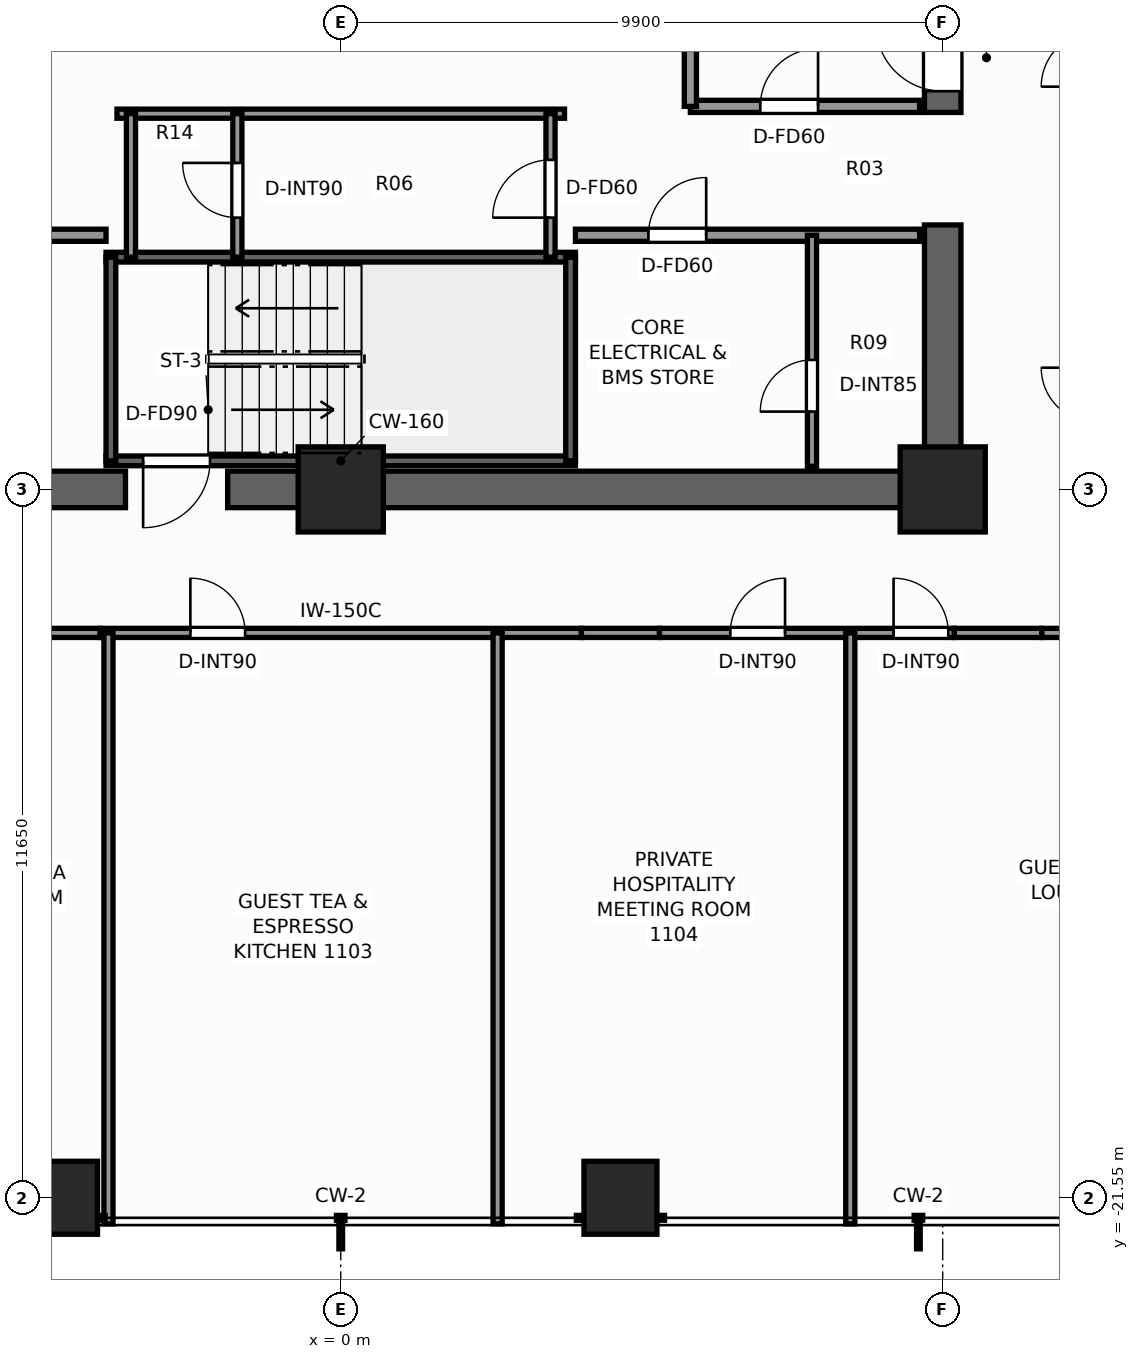
"""IFC4 building model, lengths in metres.
Left out: names, types, materials, properties, quantities, classifications, styles, units other than length and angle.
Written with IfcOpenShell. Run it as: python <this file> out.ifc"""

import sys

from ifc_helpers import new_model, si_unit, direction, frame, frame_2d, origin, origin_2d, place, context, subcontext, project, spatial, rectangle, extrude, element, fill, save


model = new_model("IFC4")
c1 = context("Model", 3, precision=1e-05, world=origin(), true_north=direction((0.0, 1.0)))
c2 = subcontext(c1, "Body", "Model", "MODEL_VIEW")
j1 = project(units=[si_unit("LENGTHUNIT", "METRE"), si_unit("PLANEANGLEUNIT", "RADIAN")], contexts=[c1])
p1 = place(None, origin())
s1 = spatial("IfcSite", under=j1, at=p1, CompositionType="ELEMENT")
p2 = place(p1, origin())
s2 = spatial("IfcBuilding", under=s1, at=p2, CompositionType="ELEMENT")
p3 = place(p2, frame((0.0, 0.0, 40.3)))
s3 = spatial("IfcBuildingStorey", under=s2, at=p3, CompositionType="ELEMENT", Elevation=40.3)
p4 = place(p3, frame((10.2, -9.9, 0.0), z_axis=(0.0, 0.0, 1.0), x_axis=(-1.0, 0.0, 0.0)))
e1 = element("IfcWall", 1, at=p4, inside=s3, PredefinedType="SHEAR", context=c2, shape_type="SweptSolid", body=[
    extrude(rectangle(XDim=12.06, YDim=0.6, at=frame_2d((6.03, 0.0))), origin(), (0.0, 0.0, 1.0), 3.3),
])
p5 = place(p3, frame((-3.54, -9.9, 0.0), z_axis=(0.0, 0.0, 1.0), x_axis=(-1.0, 0.0, 0.0)))
e2 = element("IfcWall", 2, at=p5, inside=s3, PredefinedType="SHEAR", context=c2, shape_type="SweptSolid", body=[
    extrude(rectangle(XDim=6.66, YDim=0.6, at=frame_2d((3.33, 0.0))), origin(), (0.0, 0.0, 1.0), 3.3),
])
p6 = place(p3, frame((9.9, -9.6, 0.0), z_axis=(0.0, 0.0, 1.0), x_axis=(0.0, 1.0, 0.0)))
e3 = element("IfcWall", 3, at=p6, inside=s3, PredefinedType="SHEAR", context=c2, shape_type="SweptSolid", body=[
    extrude(rectangle(XDim=4.05, YDim=0.6, at=frame_2d((2.025, 0.0))), origin(), (0.0, 0.0, 1.0), 3.3),
])
p7 = place(p3, frame((9.9, -3.7, 0.0), z_axis=(0.0, 0.0, 1.0), x_axis=(0.0, 1.0, 0.0)))
e4 = element("IfcWall", 4, at=p7, inside=s3, PredefinedType="SHEAR", context=c2, shape_type="SweptSolid", body=[
    extrude(rectangle(XDim=13.3, YDim=0.6, at=frame_2d((6.65, 0.0))), origin(), (0.0, 0.0, 1.0), 3.3),
])
p8 = place(p7, frame((0.35, 0.0, 0.0)))
e5 = element("IfcOpeningElement", 5, at=p8, cuts=e4, PredefinedType="OPENING", context=c2, shape_type="SweptSolid", body=[
    extrude(rectangle(XDim=1.1, YDim=2.2, at=frame_2d((0.55, 1.1))), frame((0.0, 0.31, 0.0), z_axis=(0.0, -1.0, 0.0), x_axis=(1.0, 0.0, 0.0)), (0.0, 0.0, 1.0), 0.62),
])
for number, where, z_axis, x_axis in (
    (6, (9.9, -9.9, 0.0), (0.0, 0.0, 1.0), (1.0, 0.0, 0.0)),
    (7, (0.0, -9.9, 0.0), (0.0, 0.0, 1.0), (1.0, 0.0, 0.0)),
):
    element("IfcColumn", number, at=place(p3, frame(where, z_axis=z_axis, x_axis=x_axis)), inside=s3, PredefinedType="COLUMN", context=c2, shape_type="SweptSolid", body=[
        extrude(rectangle(XDim=1.4, YDim=1.4, at=origin_2d()), origin(), (0.0, 0.0, 1.0), 3.3),
    ])
for number, where, z_axis, x_axis in (
    (8, (-4.6, -21.55, 0.0), (0.0, 0.0, 1.0), (1.0, 0.0, 0.0)),
    (9, (4.6, -21.55, 0.0), (0.0, 0.0, 1.0), (1.0, 0.0, 0.0)),
):
    element("IfcColumn", number, at=place(p3, frame(where, z_axis=z_axis, x_axis=x_axis)), inside=s3, PredefinedType="COLUMN", context=c2, shape_type="SweptSolid", body=[
        extrude(rectangle(XDim=1.2, YDim=1.2, at=origin_2d()), origin(), (0.0, 0.0, 1.0), 3.3),
    ])
p9 = place(p3, frame((3.86, -9.43, 0.0), z_axis=(0.0, 0.0, 1.0), x_axis=(-1.0, 0.0, 0.0)))
e10 = element("IfcWall", 10, at=p9, inside=s3, PredefinedType="SHEAR", context=c2, shape_type="SweptSolid", body=[
    extrude(rectangle(XDim=7.72, YDim=0.16, at=frame_2d((3.86, 0.0))), origin(), (0.0, 0.0, 1.0), 3.3),
])
p10 = place(p9, frame((6.01, 0.0, 0.0)))
e11 = element("IfcOpeningElement", 11, at=p10, cuts=e10, PredefinedType="OPENING", context=c2, shape_type="SweptSolid", body=[
    extrude(rectangle(XDim=1.1, YDim=2.2, at=frame_2d((0.55, 1.1))), frame((0.0, 0.09, 0.0), z_axis=(0.0, -1.0, 0.0), x_axis=(1.0, 0.0, 0.0)), (0.0, 0.0, 1.0), 0.18),
])
p11 = place(p3, frame((-3.86, -6.08, 0.0), z_axis=(0.0, 0.0, 1.0), x_axis=(1.0, 0.0, 0.0)))
e12 = element("IfcWall", 12, at=p11, inside=s3, PredefinedType="SHEAR", context=c2, shape_type="SweptSolid", body=[
    extrude(rectangle(XDim=7.72, YDim=0.16, at=frame_2d((3.86, 0.0))), origin(), (0.0, 0.0, 1.0), 3.3),
])
for number, where, z_axis, x_axis in (
    (13, (-3.78, -9.43, 0.0), (0.0, 0.0, 1.0), (0.0, 1.0, 0.0)),
    (14, (3.78, -9.43, 0.0), (0.0, 0.0, 1.0), (0.0, 1.0, 0.0)),
):
    element("IfcWall", number, at=place(p3, frame(where, z_axis=z_axis, x_axis=x_axis)), inside=s3, PredefinedType="SHEAR", context=c2, shape_type="SweptSolid", body=[
        extrude(rectangle(XDim=3.35, YDim=0.16, at=frame_2d((1.675, 0.0))), origin(), (0.0, 0.0, 1.0), 3.3),
    ])
p12 = place(p3, frame((5.75, -3.6, 0.0), z_axis=(0.0, 0.0, 1.0), x_axis=(1.0, 0.0, 0.0)))
e15 = element("IfcWall", 15, at=p12, inside=s3, PredefinedType="SOLIDWALL", context=c2, shape_type="SweptSolid", body=[
    extrude(rectangle(XDim=3.77, YDim=0.2, at=frame_2d((1.885, 0.0))), origin(), (0.0, 0.0, 1.0), 3.06),
])
p13 = place(p12, frame((1.15, 0.0, 0.0)))
e16 = element("IfcOpeningElement", 16, at=p13, cuts=e15, PredefinedType="OPENING", context=c2, shape_type="SweptSolid", body=[
    extrude(rectangle(XDim=0.95, YDim=2.06, at=frame_2d((0.475, 1.03))), frame((0.0, 0.11, 0.0), z_axis=(0.0, -1.0, 0.0), x_axis=(1.0, 0.0, 0.0)), (0.0, 0.0, 1.0), 0.22),
])
p14 = place(p3, frame((5.75, -3.6, 0.0), z_axis=(0.0, 0.0, 1.0), x_axis=(0.0, 1.0, 0.0)))
e17 = element("IfcWall", 17, at=p14, inside=s3, PredefinedType="SOLIDWALL", context=c2, shape_type="SweptSolid", body=[
    extrude(rectangle(XDim=5.57, YDim=0.2, at=frame_2d((2.785, 0.0))), origin(), (0.0, 0.0, 1.0), 3.06),
])
p15 = place(p14, frame((2.75, 0.0, 0.0)))
e18 = element("IfcOpeningElement", 18, at=p15, cuts=e17, PredefinedType="OPENING", context=c2, shape_type="SweptSolid", body=[
    extrude(rectangle(XDim=1.1, YDim=2.2, at=frame_2d((0.55, 1.1))), frame((0.0, 0.11, 0.0), z_axis=(0.0, -1.0, 0.0), x_axis=(1.0, 0.0, 0.0)), (0.0, 0.0, 1.0), 0.22),
])
p16 = place(p3, frame((-9.52, -5.72, 0.0), z_axis=(0.0, 0.0, 1.0), x_axis=(1.0, 0.0, 0.0)))
e19 = element("IfcWall", 19, at=p16, inside=s3, PredefinedType="SOLIDWALL", context=c2, shape_type="SweptSolid", body=[
    extrude(rectangle(XDim=5.66, YDim=0.2, at=frame_2d((2.83, 0.0))), origin(), (0.0, 0.0, 1.0), 3.06),
])
p17 = place(p16, frame((2.8, 0.0, 0.0)))
e20 = element("IfcOpeningElement", 20, at=p17, cuts=e19, PredefinedType="OPENING", context=c2, shape_type="SweptSolid", body=[
    extrude(rectangle(XDim=0.95, YDim=2.06, at=frame_2d((0.475, 1.03))), frame((0.0, 0.11, 0.0), z_axis=(0.0, -1.0, 0.0), x_axis=(1.0, 0.0, 0.0)), (0.0, 0.0, 1.0), 0.22),
])
p18 = place(p3, frame((3.86, -5.72, 0.0), z_axis=(0.0, 0.0, 1.0), x_axis=(1.0, 0.0, 0.0)))
e21 = element("IfcWall", 21, at=p18, inside=s3, PredefinedType="SOLIDWALL", context=c2, shape_type="SweptSolid", body=[
    extrude(rectangle(XDim=5.66, YDim=0.2, at=frame_2d((2.83, 0.0))), origin(), (0.0, 0.0, 1.0), 3.06),
])
p19 = place(p18, frame((1.2, 0.0, 0.0)))
e22 = element("IfcOpeningElement", 22, at=p19, cuts=e21, PredefinedType="OPENING", context=c2, shape_type="SweptSolid", body=[
    extrude(rectangle(XDim=0.95, YDim=2.06, at=frame_2d((0.475, 1.03))), frame((0.0, 0.11, 0.0), z_axis=(0.0, -1.0, 0.0), x_axis=(1.0, 0.0, 0.0)), (0.0, 0.0, 1.0), 0.22),
])
p20 = place(p3, frame((7.75, -9.52, 0.0), z_axis=(0.0, 0.0, 1.0), x_axis=(0.0, 1.0, 0.0)))
e23 = element("IfcWall", 23, at=p20, inside=s3, PredefinedType="PARTITIONING", context=c2, shape_type="SweptSolid", body=[
    extrude(rectangle(XDim=3.8, YDim=0.15, at=frame_2d((1.9, 0.0))), origin(), (0.0, 0.0, 1.0), 3.06),
])
p21 = place(p20, frame((0.9, 0.0, 0.0)))
e24 = element("IfcOpeningElement", 24, at=p21, cuts=e23, PredefinedType="OPENING", context=c2, shape_type="SweptSolid", body=[
    extrude(rectangle(XDim=0.85, YDim=2.03, at=frame_2d((0.425, 1.015))), frame((0.0, 0.085, 0.0), z_axis=(0.0, -1.0, 0.0), x_axis=(1.0, 0.0, 0.0)), (0.0, 0.0, 1.0), 0.17),
])
p22 = place(p3, frame((-3.68, -3.72, 0.0), z_axis=(0.0, 0.0, 1.0), x_axis=(1.0, 0.0, 0.0)))
e25 = element("IfcWall", 25, at=p22, inside=s3, PredefinedType="PARTITIONING", context=c2, shape_type="SweptSolid", body=[
    extrude(rectangle(XDim=7.36, YDim=0.15, at=frame_2d((3.68, 0.0))), origin(), (0.0, 0.0, 1.0), 3.06),
])
p23 = place(p3, frame((3.45, -6.08, 0.0), z_axis=(0.0, 0.0, 1.0), x_axis=(0.0, 1.0, 0.0)))
e26 = element("IfcWall", 26, at=p23, inside=s3, PredefinedType="PARTITIONING", context=c2, shape_type="SweptSolid", body=[
    extrude(rectangle(XDim=2.36, YDim=0.15, at=frame_2d((1.18, 0.0))), origin(), (0.0, 0.0, 1.0), 3.06),
])
p24 = place(p23, frame((0.65, 0.0, 0.0)))
e27 = element("IfcOpeningElement", 27, at=p24, cuts=e26, PredefinedType="OPENING", context=c2, shape_type="SweptSolid", body=[
    extrude(rectangle(XDim=0.95, YDim=2.06, at=frame_2d((0.475, 1.03))), frame((0.0, 0.085, 0.0), z_axis=(0.0, -1.0, 0.0), x_axis=(1.0, 0.0, 0.0)), (0.0, 0.0, 1.0), 0.17),
])
p25 = place(p3, frame((-3.45, -6.08, 0.0), z_axis=(0.0, 0.0, 1.0), x_axis=(0.0, 1.0, 0.0)))
e28 = element("IfcWall", 28, at=p25, inside=s3, PredefinedType="PARTITIONING", context=c2, shape_type="SweptSolid", body=[
    extrude(rectangle(XDim=2.36, YDim=0.15, at=frame_2d((1.18, 0.0))), origin(), (0.0, 0.0, 1.0), 3.06),
])
p26 = place(p3, frame((-1.7, -6.08, 0.0), z_axis=(0.0, 0.0, 1.0), x_axis=(0.0, 1.0, 0.0)))
e29 = element("IfcWall", 29, at=p26, inside=s3, PredefinedType="PARTITIONING", context=c2, shape_type="SweptSolid", body=[
    extrude(rectangle(XDim=2.36, YDim=0.15, at=frame_2d((1.18, 0.0))), origin(), (0.0, 0.0, 1.0), 3.06),
])
p27 = place(p26, frame((0.65, 0.0, 0.0)))
e30 = element("IfcOpeningElement", 30, at=p27, cuts=e29, PredefinedType="OPENING", context=c2, shape_type="SweptSolid", body=[
    extrude(rectangle(XDim=0.9, YDim=2.06, at=frame_2d((0.45, 1.03))), frame((0.0, 0.085, 0.0), z_axis=(0.0, -1.0, 0.0), x_axis=(1.0, 0.0, 0.0)), (0.0, 0.0, 1.0), 0.17),
])
p28 = place(p3, frame((-5.242, -12.26, 0.0), z_axis=(0.0, 0.0, 1.0), x_axis=(1.0, 0.0, 0.0)))
e31 = element("IfcWall", 31, at=p28, inside=s3, PredefinedType="PARTITIONING", context=c2, shape_type="SweptSolid", body=[
    extrude(rectangle(XDim=1.284, YDim=0.15, at=frame_2d((0.642, 0.0))), origin(), (0.0, 0.0, 1.0), 1.245),
])
p29 = place(p3, frame((-3.958, -12.26, 0.0), z_axis=(0.0, 0.0, 1.0), x_axis=(1.0, 0.0, 0.0)))
e32 = element("IfcWall", 32, at=p29, inside=s3, PredefinedType="PARTITIONING", context=c2, shape_type="SweptSolid", body=[
    extrude(rectangle(XDim=7.916, YDim=0.15, at=frame_2d((3.958, 0.0))), origin(), (0.0, 0.0, 1.0), 2.349),
])
p30 = place(p29, frame((1.485, 0.0, 0.0)))
e33 = element("IfcOpeningElement", 33, at=p30, cuts=e32, PredefinedType="OPENING", context=c2, shape_type="SweptSolid", body=[
    extrude(rectangle(XDim=0.9, YDim=2.06, at=frame_2d((0.45, 1.03))), frame((0.0, 0.085, 0.0), z_axis=(0.0, -1.0, 0.0), x_axis=(1.0, 0.0, 0.0)), (0.0, 0.0, 1.0), 0.17),
])
p31 = place(p3, frame((3.958, -12.26, 0.0), z_axis=(0.0, 0.0, 1.0), x_axis=(1.0, 0.0, 0.0)))
e34 = element("IfcWall", 34, at=p31, inside=s3, PredefinedType="PARTITIONING", context=c2, shape_type="SweptSolid", body=[
    extrude(rectangle(XDim=1.284, YDim=0.15, at=frame_2d((0.642, 0.0))), origin(), (0.0, 0.0, 1.0), 1.245),
])
p32 = place(p3, frame((5.242, -12.26, 0.0), z_axis=(0.0, 0.0, 1.0), x_axis=(1.0, 0.0, 0.0)))
e35 = element("IfcWall", 35, at=p32, inside=s3, PredefinedType="PARTITIONING", context=c2, shape_type="SweptSolid", body=[
    extrude(rectangle(XDim=4.85, YDim=0.15, at=frame_2d((2.425, 0.0))), origin(), (0.0, 0.0, 1.0), 3.06),
])
p33 = place(p32, frame((1.165, 0.0, 0.0)))
e36 = element("IfcOpeningElement", 36, at=p33, cuts=e35, PredefinedType="OPENING", context=c2, shape_type="SweptSolid", body=[
    extrude(rectangle(XDim=0.9, YDim=2.06, at=frame_2d((0.45, 1.03))), frame((0.0, 0.085, 0.0), z_axis=(0.0, -1.0, 0.0), x_axis=(1.0, 0.0, 0.0)), (0.0, 0.0, 1.0), 0.17),
])
p34 = place(p32, frame((3.85, 0.0, 0.0)))
e37 = element("IfcOpeningElement", 37, at=p34, cuts=e35, PredefinedType="OPENING", context=c2, shape_type="SweptSolid", body=[
    extrude(rectangle(XDim=0.9, YDim=2.06, at=frame_2d((0.45, 1.03))), frame((0.0, 0.085, 0.0), z_axis=(0.0, -1.0, 0.0), x_axis=(1.0, 0.0, 0.0)), (0.0, 0.0, 1.0), 0.17),
])
p35 = place(p3, frame((10.092, -12.26, 0.0), z_axis=(0.0, 0.0, 1.0), x_axis=(1.0, 0.0, 0.0)))
e38 = element("IfcWall", 38, at=p35, inside=s3, PredefinedType="PARTITIONING", context=c2, shape_type="SweptSolid", body=[
    extrude(rectangle(XDim=1.439, YDim=0.15, at=frame_2d((0.72, 0.0))), origin(), (0.0, 0.0, 1.0), 1.245),
])
p36 = place(p3, frame((11.531, -12.26, 0.0), z_axis=(0.0, 0.0, 1.0), x_axis=(1.0, 0.0, 0.0)))
e39 = element("IfcWall", 39, at=p36, inside=s3, PredefinedType="PARTITIONING", context=c2, shape_type="SweptSolid", body=[
    extrude(rectangle(XDim=0.889, YDim=0.15, at=frame_2d((0.444, 0.0))), origin(), (0.0, 0.0, 1.0), 3.06),
])
for number, where, z_axis, x_axis in (
    (40, (-3.82, -21.98, 0.0), (0.0, 0.0, 1.0), (0.0, 1.0, 0.0)),
    (41, (2.58, -21.98, 0.0), (0.0, 0.0, 1.0), (0.0, 1.0, 0.0)),
    (42, (8.38, -21.98, 0.0), (0.0, 0.0, 1.0), (0.0, 1.0, 0.0)),
):
    element("IfcWall", number, at=place(p3, frame(where, z_axis=z_axis, x_axis=x_axis)), inside=s3, PredefinedType="PARTITIONING", context=c2, shape_type="SweptSolid", body=[
        extrude(rectangle(XDim=9.72, YDim=0.15, at=frame_2d((4.86, 0.0))), origin(), (0.0, 0.0, 1.0), 2.429),
    ])
p37 = place(p10, origin())
e43 = element("IfcDoor", 43, at=p37, inside=s3, OperationType="SINGLE_SWING_RIGHT", PredefinedType="DOOR", context=c2, shape_type="SweptSolid", body=[
    extrude(rectangle(XDim=1.1, YDim=2.2, at=frame_2d((0.55, 1.1))), frame((0.0, 0.025, 0.0), z_axis=(0.0, -1.0, 0.0), x_axis=(1.0, 0.0, 0.0)), (0.0, 0.0, 1.0), 0.05),
])
fill(e11, e43)
p38 = place(p8, origin())
e44 = element("IfcDoor", 44, at=p38, inside=s3, OperationType="SINGLE_SWING_RIGHT", PredefinedType="DOOR", context=c2, shape_type="SweptSolid", body=[
    extrude(rectangle(XDim=1.1, YDim=2.2, at=frame_2d((0.55, 1.1))), frame((0.0, 0.025, 0.0), z_axis=(0.0, -1.0, 0.0), x_axis=(1.0, 0.0, 0.0)), (0.0, 0.0, 1.0), 0.05),
])
fill(e5, e44)
p39 = place(p19, origin())
e45 = element("IfcDoor", 45, at=p39, inside=s3, OperationType="SINGLE_SWING_RIGHT", PredefinedType="DOOR", context=c2, shape_type="SweptSolid", body=[
    extrude(rectangle(XDim=0.95, YDim=2.06, at=frame_2d((0.475, 1.03))), frame((0.0, 0.025, 0.0), z_axis=(0.0, -1.0, 0.0), x_axis=(1.0, 0.0, 0.0)), (0.0, 0.0, 1.0), 0.05),
])
fill(e22, e45)
p40 = place(p21, origin())
e46 = element("IfcDoor", 46, at=p40, inside=s3, OperationType="SINGLE_SWING_LEFT", PredefinedType="DOOR", context=c2, shape_type="SweptSolid", body=[
    extrude(rectangle(XDim=0.85, YDim=2.03, at=frame_2d((0.425, 1.015))), frame((0.0, 0.025, 0.0), z_axis=(0.0, -1.0, 0.0), x_axis=(1.0, 0.0, 0.0)), (0.0, 0.0, 1.0), 0.05),
])
fill(e24, e46)
p41 = place(p13, origin())
e47 = element("IfcDoor", 47, at=p41, inside=s3, OperationType="SINGLE_SWING_RIGHT", PredefinedType="DOOR", context=c2, shape_type="SweptSolid", body=[
    extrude(rectangle(XDim=0.95, YDim=2.06, at=frame_2d((0.475, 1.03))), frame((0.0, 0.025, 0.0), z_axis=(0.0, -1.0, 0.0), x_axis=(1.0, 0.0, 0.0)), (0.0, 0.0, 1.0), 0.05),
])
fill(e16, e47)
p42 = place(p24, origin())
e48 = element("IfcDoor", 48, at=p42, inside=s3, OperationType="SINGLE_SWING_LEFT", PredefinedType="DOOR", context=c2, shape_type="SweptSolid", body=[
    extrude(rectangle(XDim=0.95, YDim=2.06, at=frame_2d((0.475, 1.03))), frame((0.0, 0.025, 0.0), z_axis=(0.0, -1.0, 0.0), x_axis=(1.0, 0.0, 0.0)), (0.0, 0.0, 1.0), 0.05),
])
fill(e27, e48)
p43 = place(p27, origin())
e49 = element("IfcDoor", 49, at=p43, inside=s3, OperationType="SINGLE_SWING_RIGHT", PredefinedType="DOOR", context=c2, shape_type="SweptSolid", body=[
    extrude(rectangle(XDim=0.9, YDim=2.06, at=frame_2d((0.45, 1.03))), frame((0.0, 0.025, 0.0), z_axis=(0.0, -1.0, 0.0), x_axis=(1.0, 0.0, 0.0)), (0.0, 0.0, 1.0), 0.05),
])
fill(e30, e49)
p44 = place(p30, origin())
e50 = element("IfcDoor", 50, at=p44, inside=s3, OperationType="SINGLE_SWING_LEFT", PredefinedType="DOOR", context=c2, shape_type="SweptSolid", body=[
    extrude(rectangle(XDim=0.9, YDim=2.06, at=frame_2d((0.45, 1.03))), frame((0.0, 0.025, 0.0), z_axis=(0.0, -1.0, 0.0), x_axis=(1.0, 0.0, 0.0)), (0.0, 0.0, 1.0), 0.05),
])
fill(e33, e50)
p45 = place(p33, origin())
e51 = element("IfcDoor", 51, at=p45, inside=s3, OperationType="SINGLE_SWING_RIGHT", PredefinedType="DOOR", context=c2, shape_type="SweptSolid", body=[
    extrude(rectangle(XDim=0.9, YDim=2.06, at=frame_2d((0.45, 1.03))), frame((0.0, 0.025, 0.0), z_axis=(0.0, -1.0, 0.0), x_axis=(1.0, 0.0, 0.0)), (0.0, 0.0, 1.0), 0.05),
])
fill(e36, e51)
p46 = place(p34, origin())
e52 = element("IfcDoor", 52, at=p46, inside=s3, OperationType="SINGLE_SWING_LEFT", PredefinedType="DOOR", context=c2, shape_type="SweptSolid", body=[
    extrude(rectangle(XDim=0.9, YDim=2.06, at=frame_2d((0.45, 1.03))), frame((0.0, 0.025, 0.0), z_axis=(0.0, -1.0, 0.0), x_axis=(1.0, 0.0, 0.0)), (0.0, 0.0, 1.0), 0.05),
])
fill(e37, e52)
save(model, sys.argv[1])
